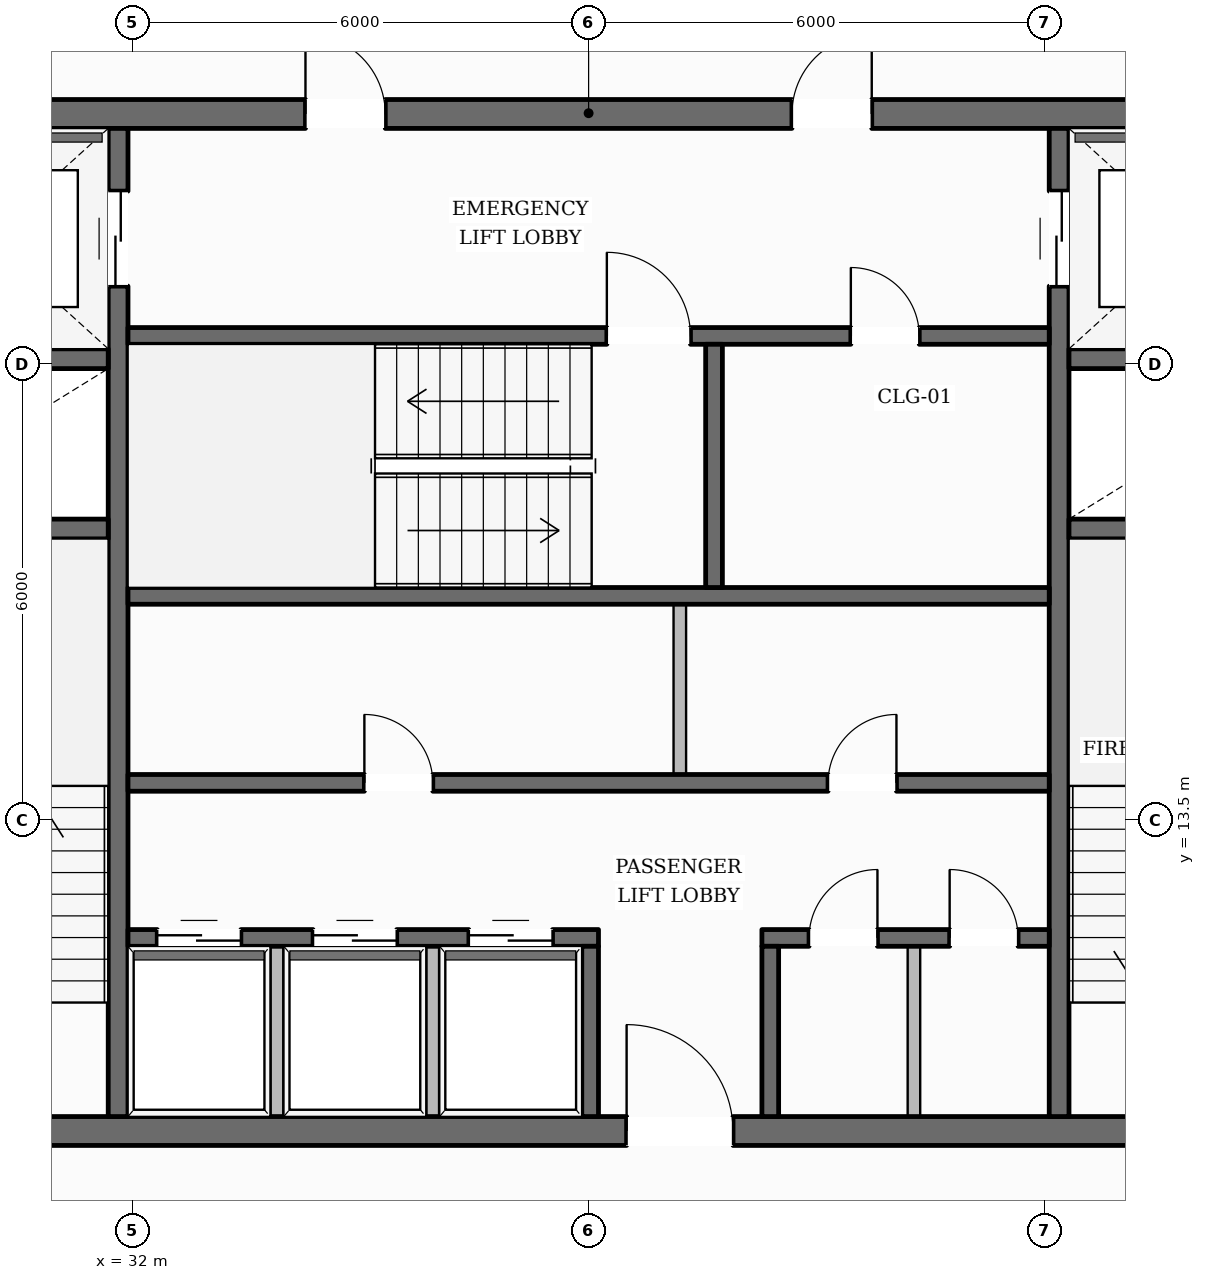
"""IFC4 building model, lengths in metres.
Left out: names, types, materials, properties, quantities, classifications, styles, units other than length and angle.
Written with IfcOpenShell. Run it as: python <this file> out.ifc"""

import sys

from ifc_helpers import new_model, si_unit, direction, frame, frame_2d, origin, place, context, subcontext, project, spatial, rectangle, extrude, element, fill, save


model = new_model("IFC4")
c1 = context("Model", 3, precision=1e-05, world=origin(), true_north=direction((0.0, 1.0)))
c2 = subcontext(c1, "Body", "Model", "MODEL_VIEW")
j1 = project(units=[si_unit("LENGTHUNIT", "METRE"), si_unit("PLANEANGLEUNIT", "RADIAN")], contexts=[c1])
p1 = place(None, origin())
s1 = spatial("IfcSite", under=j1, at=p1, CompositionType="ELEMENT")
p2 = place(p1, origin())
s2 = spatial("IfcBuilding", under=s1, at=p2, CompositionType="ELEMENT")
p3 = place(p2, frame((0.0, 0.0, 293.4)))
s3 = spatial("IfcBuildingStorey", under=s2, at=p3, CompositionType="ELEMENT", Elevation=293.4)
p4 = place(p3, frame((28.1, 9.41, 0.0), z_axis=(0.0, 0.0, 1.0), x_axis=(1.0, 0.0, 0.0)))
e1 = element("IfcWall", 1, at=p4, inside=s3, PredefinedType="SOLIDWALL", context=c2, shape_type="SweptSolid", body=[
    extrude(rectangle(XDim=19.8, YDim=0.38, at=frame_2d((9.9, 0.0))), origin(), (0.0, 0.0, 1.0), 3.61),
])
p5 = place(p4, frame((10.4, 0.0, 0.0)))
e2 = element("IfcOpeningElement", 2, at=p5, cuts=e1, PredefinedType="OPENING", context=c2, shape_type="SweptSolid", body=[
    extrude(rectangle(XDim=1.4, YDim=2.2, at=frame_2d((0.7, 1.1))), frame((0.0, 0.2, 0.0), z_axis=(0.0, -1.0, 0.0), x_axis=(1.0, 0.0, 0.0)), (0.0, 0.0, 1.0), 0.4),
])
p6 = place(p3, frame((28.1, 22.79, 0.0), z_axis=(0.0, 0.0, 1.0), x_axis=(1.0, 0.0, 0.0)))
e3 = element("IfcWall", 3, at=p6, inside=s3, PredefinedType="SOLIDWALL", context=c2, shape_type="SweptSolid", body=[
    extrude(rectangle(XDim=19.8, YDim=0.38, at=frame_2d((9.9, 0.0))), origin(), (0.0, 0.0, 1.0), 3.61),
])
p7 = place(p6, frame((6.175, 0.0, 0.0)))
e4 = element("IfcOpeningElement", 4, at=p7, cuts=e3, PredefinedType="OPENING", context=c2, shape_type="SweptSolid", body=[
    extrude(rectangle(XDim=1.05, YDim=2.15, at=frame_2d((0.525, 1.075))), frame((0.0, 0.2, 0.0), z_axis=(0.0, -1.0, 0.0), x_axis=(1.0, 0.0, 0.0)), (0.0, 0.0, 1.0), 0.4),
])
p8 = place(p6, frame((12.575, 0.0, 0.0)))
e5 = element("IfcOpeningElement", 5, at=p8, cuts=e3, PredefinedType="OPENING", context=c2, shape_type="SweptSolid", body=[
    extrude(rectangle(XDim=1.05, YDim=2.15, at=frame_2d((0.525, 1.075))), frame((0.0, 0.2, 0.0), z_axis=(0.0, -1.0, 0.0), x_axis=(1.0, 0.0, 0.0)), (0.0, 0.0, 1.0), 0.4),
])
p9 = place(p3, frame((31.81, 9.6, 0.0), z_axis=(0.0, 0.0, 1.0), x_axis=(0.0, 1.0, 0.0)))
e6 = element("IfcWall", 6, at=p9, inside=s3, PredefinedType="SHEAR", context=c2, shape_type="SweptSolid", body=[
    extrude(rectangle(XDim=13.0, YDim=0.26, at=frame_2d((6.5, 0.0))), origin(), (0.0, 0.0, 1.0), 3.61),
])
p10 = place(p9, frame((10.925, 0.0, 0.0)))
e7 = element("IfcOpeningElement", 7, at=p10, cuts=e6, PredefinedType="OPENING", context=c2, shape_type="SweptSolid", body=[
    extrude(rectangle(XDim=1.25, YDim=2.25, at=frame_2d((0.625, 1.125))), frame((0.0, 0.14, 0.0), z_axis=(0.0, -1.0, 0.0), x_axis=(1.0, 0.0, 0.0)), (0.0, 0.0, 1.0), 0.28),
])
p11 = place(p3, frame((44.19, 9.6, 0.0), z_axis=(0.0, 0.0, 1.0), x_axis=(0.0, 1.0, 0.0)))
e8 = element("IfcWall", 8, at=p11, inside=s3, PredefinedType="SHEAR", context=c2, shape_type="SweptSolid", body=[
    extrude(rectangle(XDim=13.0, YDim=0.26, at=frame_2d((6.5, 0.0))), origin(), (0.0, 0.0, 1.0), 3.61),
])
p12 = place(p11, frame((10.925, 0.0, 0.0)))
e9 = element("IfcOpeningElement", 9, at=p12, cuts=e8, PredefinedType="OPENING", context=c2, shape_type="SweptSolid", body=[
    extrude(rectangle(XDim=1.25, YDim=2.25, at=frame_2d((0.625, 1.125))), frame((0.0, 0.14, 0.0), z_axis=(0.0, -1.0, 0.0), x_axis=(1.0, 0.0, 0.0)), (0.0, 0.0, 1.0), 0.28),
])
for number, where, z_axis, x_axis in (
    (10, (28.48, 17.33, 0.0), (0.0, 0.0, 1.0), (1.0, 0.0, 0.0)),
    (11, (28.48, 19.57, 0.0), (0.0, 0.0, 1.0), (1.0, 0.0, 0.0)),
    (12, (44.32, 17.33, 0.0), (0.0, 0.0, 1.0), (1.0, 0.0, 0.0)),
    (13, (44.32, 19.57, 0.0), (0.0, 0.0, 1.0), (1.0, 0.0, 0.0)),
):
    element("IfcWall", number, at=place(p3, frame(where, z_axis=z_axis, x_axis=x_axis)), inside=s3, PredefinedType="SHEAR", context=c2, shape_type="SweptSolid", body=[
        extrude(rectangle(XDim=3.2, YDim=0.26, at=frame_2d((1.6, 0.0))), origin(), (0.0, 0.0, 1.0), 3.61),
    ])
p13 = place(p3, frame((31.94, 19.87, 0.0), z_axis=(0.0, 0.0, 1.0), x_axis=(1.0, 0.0, 0.0)))
e14 = element("IfcWall", 14, at=p13, inside=s3, PredefinedType="SOLIDWALL", context=c2, shape_type="SweptSolid", body=[
    extrude(rectangle(XDim=12.12, YDim=0.22, at=frame_2d((6.06, 0.0))), origin(), (0.0, 0.0, 1.0), 3.61),
])
p14 = place(p13, frame((6.3, 0.0, 0.0)))
e15 = element("IfcOpeningElement", 15, at=p14, cuts=e14, PredefinedType="OPENING", context=c2, shape_type="SweptSolid", body=[
    extrude(rectangle(XDim=1.1, YDim=2.15, at=frame_2d((0.55, 1.075))), frame((0.0, 0.12, 0.0), z_axis=(0.0, -1.0, 0.0), x_axis=(1.0, 0.0, 0.0)), (0.0, 0.0, 1.0), 0.24),
])
p15 = place(p13, frame((9.51, 0.0, 0.0)))
e16 = element("IfcOpeningElement", 16, at=p15, cuts=e14, PredefinedType="OPENING", context=c2, shape_type="SweptSolid", body=[
    extrude(rectangle(XDim=0.9, YDim=2.1, at=frame_2d((0.45, 1.05))), frame((0.0, 0.12, 0.0), z_axis=(0.0, -1.0, 0.0), x_axis=(1.0, 0.0, 0.0)), (0.0, 0.0, 1.0), 0.24),
])
p16 = place(p3, frame((31.94, 16.45, 0.0), z_axis=(0.0, 0.0, 1.0), x_axis=(1.0, 0.0, 0.0)))
e17 = element("IfcWall", 17, at=p16, inside=s3, PredefinedType="SOLIDWALL", context=c2, shape_type="SweptSolid", body=[
    extrude(rectangle(XDim=12.12, YDim=0.22, at=frame_2d((6.06, 0.0))), origin(), (0.0, 0.0, 1.0), 3.61),
])
p17 = place(p3, frame((39.65, 16.56, 0.0), z_axis=(0.0, 0.0, 1.0), x_axis=(0.0, 1.0, 0.0)))
e18 = element("IfcWall", 18, at=p17, inside=s3, PredefinedType="SOLIDWALL", context=c2, shape_type="SweptSolid", body=[
    extrude(rectangle(XDim=3.2, YDim=0.22, at=frame_2d((1.6, 0.0))), origin(), (0.0, 0.0, 1.0), 3.61),
])
p18 = place(p3, frame((31.94, 13.99, 0.0), z_axis=(0.0, 0.0, 1.0), x_axis=(1.0, 0.0, 0.0)))
e19 = element("IfcWall", 19, at=p18, inside=s3, PredefinedType="SOLIDWALL", context=c2, shape_type="SweptSolid", body=[
    extrude(rectangle(XDim=12.12, YDim=0.22, at=frame_2d((6.06, 0.0))), origin(), (0.0, 0.0, 1.0), 3.61),
])
p19 = place(p18, frame((3.11, 0.0, 0.0)))
e20 = element("IfcOpeningElement", 20, at=p19, cuts=e19, PredefinedType="OPENING", context=c2, shape_type="SweptSolid", body=[
    extrude(rectangle(XDim=0.9, YDim=2.1, at=frame_2d((0.45, 1.05))), frame((0.0, 0.12, 0.0), z_axis=(0.0, -1.0, 0.0), x_axis=(1.0, 0.0, 0.0)), (0.0, 0.0, 1.0), 0.24),
])
p20 = place(p18, frame((9.21, 0.0, 0.0)))
e21 = element("IfcOpeningElement", 21, at=p20, cuts=e19, PredefinedType="OPENING", context=c2, shape_type="SweptSolid", body=[
    extrude(rectangle(XDim=0.9, YDim=2.1, at=frame_2d((0.45, 1.05))), frame((0.0, 0.12, 0.0), z_axis=(0.0, -1.0, 0.0), x_axis=(1.0, 0.0, 0.0)), (0.0, 0.0, 1.0), 0.24),
])
p21 = place(p3, frame((31.94, 11.95, 0.0), z_axis=(0.0, 0.0, 1.0), x_axis=(1.0, 0.0, 0.0)))
e22 = element("IfcWall", 22, at=p21, inside=s3, PredefinedType="SOLIDWALL", context=c2, shape_type="SweptSolid", body=[
    extrude(rectangle(XDim=6.19, YDim=0.22, at=frame_2d((3.095, 0.0))), origin(), (0.0, 0.0, 1.0), 3.61),
])
p22 = place(p21, frame((0.385, 0.0, 0.0)))
e23 = element("IfcOpeningElement", 23, at=p22, cuts=e22, PredefinedType="OPENING", context=c2, shape_type="SweptSolid", body=[
    extrude(rectangle(XDim=1.1, YDim=2.2, at=frame_2d((0.55, 1.1))), frame((0.0, 0.12, 0.0), z_axis=(0.0, -1.0, 0.0), x_axis=(1.0, 0.0, 0.0)), (0.0, 0.0, 1.0), 0.24),
])
p23 = place(p21, frame((2.435, 0.0, 0.0)))
e24 = element("IfcOpeningElement", 24, at=p23, cuts=e22, PredefinedType="OPENING", context=c2, shape_type="SweptSolid", body=[
    extrude(rectangle(XDim=1.1, YDim=2.2, at=frame_2d((0.55, 1.1))), frame((0.0, 0.12, 0.0), z_axis=(0.0, -1.0, 0.0), x_axis=(1.0, 0.0, 0.0)), (0.0, 0.0, 1.0), 0.24),
])
p24 = place(p21, frame((4.485, 0.0, 0.0)))
e25 = element("IfcOpeningElement", 25, at=p24, cuts=e22, PredefinedType="OPENING", context=c2, shape_type="SweptSolid", body=[
    extrude(rectangle(XDim=1.1, YDim=2.2, at=frame_2d((0.55, 1.1))), frame((0.0, 0.12, 0.0), z_axis=(0.0, -1.0, 0.0), x_axis=(1.0, 0.0, 0.0)), (0.0, 0.0, 1.0), 0.24),
])
p25 = place(p3, frame((40.28, 11.95, 0.0), z_axis=(0.0, 0.0, 1.0), x_axis=(1.0, 0.0, 0.0)))
e26 = element("IfcWall", 26, at=p25, inside=s3, PredefinedType="SOLIDWALL", context=c2, shape_type="SweptSolid", body=[
    extrude(rectangle(XDim=3.78, YDim=0.22, at=frame_2d((1.89, 0.0))), origin(), (0.0, 0.0, 1.0), 3.61),
])
p26 = place(p25, frame((0.62, 0.0, 0.0)))
e27 = element("IfcOpeningElement", 27, at=p26, cuts=e26, PredefinedType="OPENING", context=c2, shape_type="SweptSolid", body=[
    extrude(rectangle(XDim=0.9, YDim=2.1, at=frame_2d((0.45, 1.05))), frame((0.0, 0.12, 0.0), z_axis=(0.0, -1.0, 0.0), x_axis=(1.0, 0.0, 0.0)), (0.0, 0.0, 1.0), 0.24),
])
p27 = place(p25, frame((2.47, 0.0, 0.0)))
e28 = element("IfcOpeningElement", 28, at=p27, cuts=e26, PredefinedType="OPENING", context=c2, shape_type="SweptSolid", body=[
    extrude(rectangle(XDim=0.9, YDim=2.1, at=frame_2d((0.45, 1.05))), frame((0.0, 0.12, 0.0), z_axis=(0.0, -1.0, 0.0), x_axis=(1.0, 0.0, 0.0)), (0.0, 0.0, 1.0), 0.24),
])
for number, where, z_axis, x_axis in (
    (29, (38.02, 9.6, 0.0), (0.0, 0.0, 1.0), (0.0, 1.0, 0.0)),
    (30, (40.39, 9.6, 0.0), (0.0, 0.0, 1.0), (0.0, 1.0, 0.0)),
):
    element("IfcWall", number, at=place(p3, frame(where, z_axis=z_axis, x_axis=x_axis)), inside=s3, PredefinedType="SOLIDWALL", context=c2, shape_type="SweptSolid", body=[
        extrude(rectangle(XDim=2.24, YDim=0.22, at=frame_2d((1.12, 0.0))), origin(), (0.0, 0.0, 1.0), 3.61),
    ])
p28 = place(p3, frame((15.381, 10.05, 0.0), z_axis=(0.0, 0.0, 1.0), x_axis=(0.501350047618, 0.865244549104, 0.0)))
e31 = element("IfcWall", 31, at=p28, inside=s3, PredefinedType="STANDARD", context=c2, shape_type="SweptSolid", body=[
    extrude(rectangle(XDim=39.715, YDim=0.35, at=frame_2d((19.857, 0.0))), origin(), (0.0, 0.0, 1.0), 3.196),
])
p29 = place(p28, frame((9.529, 0.0, 0.0)))
e32 = element("IfcOpeningElement", 32, at=p29, cuts=e31, PredefinedType="OPENING", context=c2, shape_type="SweptSolid", body=[
    extrude(rectangle(XDim=1.0, YDim=2.2, at=frame_2d((0.5, 1.1))), frame((0.0, 0.185, 0.0), z_axis=(0.0, -1.0, 0.0), x_axis=(1.0, 0.0, 0.0)), (0.0, 0.0, 1.0), 0.37),
])
p30 = place(p28, frame((35.336, 0.0, 0.65)))
e33 = element("IfcOpeningElement", 33, at=p30, cuts=e31, PredefinedType="OPENING", context=c2, shape_type="SweptSolid", body=[
    extrude(rectangle(XDim=1.35, YDim=1.75, at=frame_2d((0.675, 0.875))), frame((0.0, 0.185, 0.0), z_axis=(0.0, -1.0, 0.0), x_axis=(1.0, 0.0, 0.0)), (0.0, 0.0, 1.0), 0.37),
])
p31 = place(p28, frame((28.875, 0.0, 0.65)))
e34 = element("IfcOpeningElement", 34, at=p31, cuts=e31, PredefinedType="OPENING", context=c2, shape_type="SweptSolid", body=[
    extrude(rectangle(XDim=1.35, YDim=1.75, at=frame_2d((0.675, 0.875))), frame((0.0, 0.185, 0.0), z_axis=(0.0, -1.0, 0.0), x_axis=(1.0, 0.0, 0.0)), (0.0, 0.0, 1.0), 0.37),
])
p32 = place(p28, frame((22.414, 0.0, 0.65)))
e35 = element("IfcOpeningElement", 35, at=p32, cuts=e31, PredefinedType="OPENING", context=c2, shape_type="SweptSolid", body=[
    extrude(rectangle(XDim=1.35, YDim=1.75, at=frame_2d((0.675, 0.875))), frame((0.0, 0.185, 0.0), z_axis=(0.0, -1.0, 0.0), x_axis=(1.0, 0.0, 0.0)), (0.0, 0.0, 1.0), 0.37),
])
p33 = place(p28, frame((3.03, 0.0, 0.65)))
e36 = element("IfcOpeningElement", 36, at=p33, cuts=e31, PredefinedType="OPENING", context=c2, shape_type="SweptSolid", body=[
    extrude(rectangle(XDim=1.35, YDim=1.75, at=frame_2d((0.675, 0.875))), frame((0.0, 0.185, 0.0), z_axis=(0.0, -1.0, 0.0), x_axis=(1.0, 0.0, 0.0)), (0.0, 0.0, 1.0), 0.37),
])
p34 = place(p3, frame((40.595, 44.482, 0.0), z_axis=(0.0, 0.0, 1.0), x_axis=(0.491607932601, -0.870816651543, 0.0)))
e37 = element("IfcWall", 37, at=p34, inside=s3, PredefinedType="STANDARD", context=c2, shape_type="SweptSolid", body=[
    extrude(rectangle(XDim=38.965, YDim=0.35, at=frame_2d((19.482, 0.0))), origin(), (0.0, 0.0, 1.0), 3.196),
])
p35 = place(p34, frame((9.341, 0.0, 0.0)))
e38 = element("IfcOpeningElement", 38, at=p35, cuts=e37, PredefinedType="OPENING", context=c2, shape_type="SweptSolid", body=[
    extrude(rectangle(XDim=1.0, YDim=2.2, at=frame_2d((0.5, 1.1))), frame((0.0, 0.185, 0.0), z_axis=(0.0, -1.0, 0.0), x_axis=(1.0, 0.0, 0.0)), (0.0, 0.0, 1.0), 0.37),
])
p36 = place(p34, frame((34.648, 0.0, 0.65)))
e39 = element("IfcOpeningElement", 39, at=p36, cuts=e37, PredefinedType="OPENING", context=c2, shape_type="SweptSolid", body=[
    extrude(rectangle(XDim=1.35, YDim=1.75, at=frame_2d((0.675, 0.875))), frame((0.0, 0.185, 0.0), z_axis=(0.0, -1.0, 0.0), x_axis=(1.0, 0.0, 0.0)), (0.0, 0.0, 1.0), 0.37),
])
p37 = place(p34, frame((28.314, 0.0, 0.65)))
e40 = element("IfcOpeningElement", 40, at=p37, cuts=e37, PredefinedType="OPENING", context=c2, shape_type="SweptSolid", body=[
    extrude(rectangle(XDim=1.35, YDim=1.75, at=frame_2d((0.675, 0.875))), frame((0.0, 0.185, 0.0), z_axis=(0.0, -1.0, 0.0), x_axis=(1.0, 0.0, 0.0)), (0.0, 0.0, 1.0), 0.37),
])
p38 = place(p34, frame((21.979, 0.0, 0.65)))
e41 = element("IfcOpeningElement", 41, at=p38, cuts=e37, PredefinedType="OPENING", context=c2, shape_type="SweptSolid", body=[
    extrude(rectangle(XDim=1.35, YDim=1.75, at=frame_2d((0.675, 0.875))), frame((0.0, 0.185, 0.0), z_axis=(0.0, -1.0, 0.0), x_axis=(1.0, 0.0, 0.0)), (0.0, 0.0, 1.0), 0.37),
])
p39 = place(p34, frame((2.976, 0.0, 0.65)))
e42 = element("IfcOpeningElement", 42, at=p39, cuts=e37, PredefinedType="OPENING", context=c2, shape_type="SweptSolid", body=[
    extrude(rectangle(XDim=1.35, YDim=1.75, at=frame_2d((0.675, 0.875))), frame((0.0, 0.185, 0.0), z_axis=(0.0, -1.0, 0.0), x_axis=(1.0, 0.0, 0.0)), (0.0, 0.0, 1.0), 0.37),
])
for number, where, z_axis, x_axis in (
    (43, (33.9, 9.49, 0.0), (0.0, 0.0, 1.0), (0.0, 1.0, 0.0)),
    (44, (35.95, 9.49, 0.0), (0.0, 0.0, 1.0), (0.0, 1.0, 0.0)),
):
    element("IfcWall", number, at=place(p3, frame(where, z_axis=z_axis, x_axis=x_axis)), inside=s3, PredefinedType="PARTITIONING", context=c2, shape_type="SweptSolid", body=[
        extrude(rectangle(XDim=2.35, YDim=0.165, at=frame_2d((1.175, 0.0))), origin(), (0.0, 0.0, 1.0), 3.61),
    ])
p40 = place(p3, frame((39.2, 14.1, 0.0), z_axis=(0.0, 0.0, 1.0), x_axis=(0.0, 1.0, 0.0)))
e45 = element("IfcWall", 45, at=p40, inside=s3, PredefinedType="PARTITIONING", context=c2, shape_type="SweptSolid", body=[
    extrude(rectangle(XDim=2.24, YDim=0.165, at=frame_2d((1.12, 0.0))), origin(), (0.0, 0.0, 1.0), 3.61),
])
p41 = place(p3, frame((42.28, 9.49, 0.0), z_axis=(0.0, 0.0, 1.0), x_axis=(0.0, 1.0, 0.0)))
e46 = element("IfcWall", 46, at=p41, inside=s3, PredefinedType="PARTITIONING", context=c2, shape_type="SweptSolid", body=[
    extrude(rectangle(XDim=2.35, YDim=0.165, at=frame_2d((1.175, 0.0))), origin(), (0.0, 0.0, 1.0), 3.61),
])
p42 = place(p14, origin())
e47 = element("IfcDoor", 47, at=p42, inside=s3, OperationType="SINGLE_SWING_LEFT", PredefinedType="DOOR", context=c2, shape_type="SweptSolid", body=[
    extrude(rectangle(XDim=1.1, YDim=2.15, at=frame_2d((0.55, 1.075))), frame((0.0, 0.025, 0.0), z_axis=(0.0, -1.0, 0.0), x_axis=(1.0, 0.0, 0.0)), (0.0, 0.0, 1.0), 0.05),
])
fill(e15, e47)
p43 = place(p7, origin())
e48 = element("IfcDoor", 48, at=p43, inside=s3, OperationType="SINGLE_SWING_LEFT", PredefinedType="DOOR", context=c2, shape_type="SweptSolid", body=[
    extrude(rectangle(XDim=1.05, YDim=2.15, at=frame_2d((0.525, 1.075))), frame((0.0, 0.025, 0.0), z_axis=(0.0, -1.0, 0.0), x_axis=(1.0, 0.0, 0.0)), (0.0, 0.0, 1.0), 0.05),
])
fill(e4, e48)
p44 = place(p8, origin())
e49 = element("IfcDoor", 49, at=p44, inside=s3, OperationType="SINGLE_SWING_RIGHT", PredefinedType="DOOR", context=c2, shape_type="SweptSolid", body=[
    extrude(rectangle(XDim=1.05, YDim=2.15, at=frame_2d((0.525, 1.075))), frame((0.0, 0.025, 0.0), z_axis=(0.0, -1.0, 0.0), x_axis=(1.0, 0.0, 0.0)), (0.0, 0.0, 1.0), 0.05),
])
fill(e5, e49)
p45 = place(p10, origin())
e50 = element("IfcDoor", 50, at=p45, inside=s3, OperationType="DOUBLE_DOOR_SLIDING", PredefinedType="DOOR", context=c2, shape_type="SweptSolid", body=[
    extrude(rectangle(XDim=1.25, YDim=2.25, at=frame_2d((0.625, 1.125))), frame((0.0, 0.025, 0.0), z_axis=(0.0, -1.0, 0.0), x_axis=(1.0, 0.0, 0.0)), (0.0, 0.0, 1.0), 0.05),
])
fill(e7, e50)
p46 = place(p12, origin())
e51 = element("IfcDoor", 51, at=p46, inside=s3, OperationType="DOUBLE_DOOR_SLIDING", PredefinedType="DOOR", context=c2, shape_type="SweptSolid", body=[
    extrude(rectangle(XDim=1.25, YDim=2.25, at=frame_2d((0.625, 1.125))), frame((0.0, 0.025, 0.0), z_axis=(0.0, -1.0, 0.0), x_axis=(1.0, 0.0, 0.0)), (0.0, 0.0, 1.0), 0.05),
])
fill(e9, e51)
p47 = place(p5, origin())
e52 = element("IfcDoor", 52, at=p47, inside=s3, OperationType="SINGLE_SWING_LEFT", PredefinedType="DOOR", context=c2, shape_type="SweptSolid", body=[
    extrude(rectangle(XDim=1.4, YDim=2.2, at=frame_2d((0.7, 1.1))), frame((0.0, 0.025, 0.0), z_axis=(0.0, -1.0, 0.0), x_axis=(1.0, 0.0, 0.0)), (0.0, 0.0, 1.0), 0.05),
])
fill(e2, e52)
p48 = place(p22, origin())
e53 = element("IfcDoor", 53, at=p48, inside=s3, OperationType="DOUBLE_DOOR_SLIDING", PredefinedType="DOOR", context=c2, shape_type="SweptSolid", body=[
    extrude(rectangle(XDim=1.1, YDim=2.2, at=frame_2d((0.55, 1.1))), frame((0.0, 0.025, 0.0), z_axis=(0.0, -1.0, 0.0), x_axis=(1.0, 0.0, 0.0)), (0.0, 0.0, 1.0), 0.05),
])
fill(e23, e53)
p49 = place(p23, origin())
e54 = element("IfcDoor", 54, at=p49, inside=s3, OperationType="DOUBLE_DOOR_SLIDING", PredefinedType="DOOR", context=c2, shape_type="SweptSolid", body=[
    extrude(rectangle(XDim=1.1, YDim=2.2, at=frame_2d((0.55, 1.1))), frame((0.0, 0.025, 0.0), z_axis=(0.0, -1.0, 0.0), x_axis=(1.0, 0.0, 0.0)), (0.0, 0.0, 1.0), 0.05),
])
fill(e24, e54)
p50 = place(p24, origin())
e55 = element("IfcDoor", 55, at=p50, inside=s3, OperationType="DOUBLE_DOOR_SLIDING", PredefinedType="DOOR", context=c2, shape_type="SweptSolid", body=[
    extrude(rectangle(XDim=1.1, YDim=2.2, at=frame_2d((0.55, 1.1))), frame((0.0, 0.025, 0.0), z_axis=(0.0, -1.0, 0.0), x_axis=(1.0, 0.0, 0.0)), (0.0, 0.0, 1.0), 0.05),
])
fill(e25, e55)
p51 = place(p19, origin())
e56 = element("IfcDoor", 56, at=p51, inside=s3, OperationType="SINGLE_SWING_LEFT", PredefinedType="DOOR", context=c2, shape_type="SweptSolid", body=[
    extrude(rectangle(XDim=0.9, YDim=2.1, at=frame_2d((0.45, 1.05))), frame((0.0, 0.025, 0.0), z_axis=(0.0, -1.0, 0.0), x_axis=(1.0, 0.0, 0.0)), (0.0, 0.0, 1.0), 0.05),
])
fill(e20, e56)
p52 = place(p20, origin())
e57 = element("IfcDoor", 57, at=p52, inside=s3, OperationType="SINGLE_SWING_RIGHT", PredefinedType="DOOR", context=c2, shape_type="SweptSolid", body=[
    extrude(rectangle(XDim=0.9, YDim=2.1, at=frame_2d((0.45, 1.05))), frame((0.0, 0.025, 0.0), z_axis=(0.0, -1.0, 0.0), x_axis=(1.0, 0.0, 0.0)), (0.0, 0.0, 1.0), 0.05),
])
fill(e21, e57)
p53 = place(p15, origin())
e58 = element("IfcDoor", 58, at=p53, inside=s3, OperationType="SINGLE_SWING_LEFT", PredefinedType="DOOR", context=c2, shape_type="SweptSolid", body=[
    extrude(rectangle(XDim=0.9, YDim=2.1, at=frame_2d((0.45, 1.05))), frame((0.0, 0.025, 0.0), z_axis=(0.0, -1.0, 0.0), x_axis=(1.0, 0.0, 0.0)), (0.0, 0.0, 1.0), 0.05),
])
fill(e16, e58)
p54 = place(p26, origin())
e59 = element("IfcDoor", 59, at=p54, inside=s3, OperationType="SINGLE_SWING_RIGHT", PredefinedType="DOOR", context=c2, shape_type="SweptSolid", body=[
    extrude(rectangle(XDim=0.9, YDim=2.1, at=frame_2d((0.45, 1.05))), frame((0.0, 0.025, 0.0), z_axis=(0.0, -1.0, 0.0), x_axis=(1.0, 0.0, 0.0)), (0.0, 0.0, 1.0), 0.05),
])
fill(e27, e59)
p55 = place(p27, origin())
e60 = element("IfcDoor", 60, at=p55, inside=s3, OperationType="SINGLE_SWING_LEFT", PredefinedType="DOOR", context=c2, shape_type="SweptSolid", body=[
    extrude(rectangle(XDim=0.9, YDim=2.1, at=frame_2d((0.45, 1.05))), frame((0.0, 0.025, 0.0), z_axis=(0.0, -1.0, 0.0), x_axis=(1.0, 0.0, 0.0)), (0.0, 0.0, 1.0), 0.05),
])
fill(e28, e60)
save(model, sys.argv[1])
